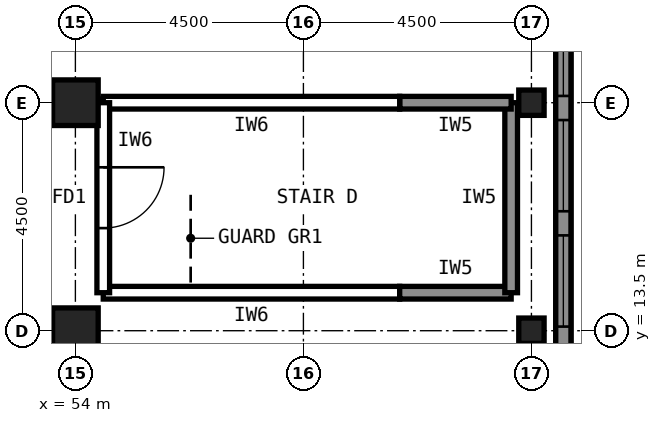
"""IFC4 building model, lengths in metres.
Left out: names, types, materials, properties, quantities, classifications, styles, units other than length and angle.
Written with IfcOpenShell. Run it as: python <this file> out.ifc"""

import sys

from ifc_helpers import new_model, si_unit, direction, frame, frame_2d, origin, origin_2d, place, context, subcontext, project, spatial, rectangle, hollow_rectangle, extrude, element, fill, save


model = new_model("IFC4")
c1 = context("Model", 3, precision=1e-05, world=origin(), true_north=direction((0.0, 1.0)))
c2 = subcontext(c1, "Body", "Model", "MODEL_VIEW")
j1 = project(units=[si_unit("LENGTHUNIT", "METRE"), si_unit("PLANEANGLEUNIT", "RADIAN")], contexts=[c1])
p1 = place(None, origin())
s1 = spatial("IfcSite", under=j1, at=p1, CompositionType="ELEMENT")
p2 = place(p1, origin())
s2 = spatial("IfcBuilding", under=s1, at=p2, CompositionType="ELEMENT")
p3 = place(p2, frame((0.0, 0.0, 18.0)))
s3 = spatial("IfcBuildingStorey", under=s2, at=p3, CompositionType="ELEMENT", Elevation=18.0)
for number, where, z_axis, x_axis in (
    (1, (54.0, 13.5, 0.0), (0.0, 0.0, 1.0), (1.0, 0.0, 0.0)),
    (2, (54.0, 18.0, 0.0), (0.0, 0.0, 1.0), (1.0, 0.0, 0.0)),
):
    element("IfcColumn", number, at=place(p3, frame(where, z_axis=z_axis, x_axis=x_axis)), inside=s3, PredefinedType="COLUMN", context=c2, shape_type="SweptSolid", body=[
        extrude(hollow_rectangle(XDim=0.9, YDim=0.9, WallThickness=0.063, at=origin_2d()), origin(), (0.0, 0.0, 1.0), 5.0),
    ])
for number, where, z_axis, x_axis in (
    (3, (63.0, 13.5, 0.0), (0.0, 0.0, 1.0), (1.0, 0.0, 0.0)),
    (4, (63.0, 18.0, 0.0), (0.0, 0.0, 1.0), (1.0, 0.0, 0.0)),
):
    element("IfcColumn", number, at=place(p3, frame(where, z_axis=z_axis, x_axis=x_axis)), inside=s3, PredefinedType="COLUMN", context=c2, shape_type="SweptSolid", body=[
        extrude(hollow_rectangle(XDim=0.5, YDim=0.5, WallThickness=0.022, at=origin_2d()), origin(), (0.0, 0.0, 1.0), 5.0),
    ])
p4 = place(p3, frame((63.63, 49.761, 0.0), z_axis=(0.0, 0.0, 1.0), x_axis=(0.0, -1.0, 0.0)))
e5 = element("IfcWall", 5, at=p4, inside=s3, PredefinedType="SOLIDWALL", context=c2, shape_type="SweptSolid", body=[
    extrude(rectangle(XDim=45.522, YDim=0.3, at=frame_2d((22.761, 0.0))), origin(), (0.0, 0.0, 1.0), 5.0),
])
p5 = place(p4, frame((2.514, 0.0, 1.1)))
e6 = element("IfcOpeningElement", 6, at=p5, cuts=e5, PredefinedType="OPENING", context=c2, shape_type="SweptSolid", body=[
    extrude(rectangle(XDim=1.8, YDim=1.2, at=frame_2d((0.9, 0.6))), frame((0.0, 0.16, 0.0), z_axis=(0.0, -1.0, 0.0), x_axis=(1.0, 0.0, 0.0)), (0.0, 0.0, 1.0), 0.32),
])
p6 = place(p4, frame((4.79, 0.0, 1.1)))
e7 = element("IfcOpeningElement", 7, at=p6, cuts=e5, PredefinedType="OPENING", context=c2, shape_type="SweptSolid", body=[
    extrude(rectangle(XDim=1.8, YDim=1.2, at=frame_2d((0.9, 0.6))), frame((0.0, 0.16, 0.0), z_axis=(0.0, -1.0, 0.0), x_axis=(1.0, 0.0, 0.0)), (0.0, 0.0, 1.0), 0.32),
])
p7 = place(p4, frame((7.066, 0.0, 1.1)))
e8 = element("IfcOpeningElement", 8, at=p7, cuts=e5, PredefinedType="OPENING", context=c2, shape_type="SweptSolid", body=[
    extrude(rectangle(XDim=1.8, YDim=1.2, at=frame_2d((0.9, 0.6))), frame((0.0, 0.16, 0.0), z_axis=(0.0, -1.0, 0.0), x_axis=(1.0, 0.0, 0.0)), (0.0, 0.0, 1.0), 0.32),
])
p8 = place(p4, frame((9.343, 0.0, 1.1)))
e9 = element("IfcOpeningElement", 9, at=p8, cuts=e5, PredefinedType="OPENING", context=c2, shape_type="SweptSolid", body=[
    extrude(rectangle(XDim=1.8, YDim=1.2, at=frame_2d((0.9, 0.6))), frame((0.0, 0.16, 0.0), z_axis=(0.0, -1.0, 0.0), x_axis=(1.0, 0.0, 0.0)), (0.0, 0.0, 1.0), 0.32),
])
p9 = place(p4, frame((11.619, 0.0, 1.1)))
e10 = element("IfcOpeningElement", 10, at=p9, cuts=e5, PredefinedType="OPENING", context=c2, shape_type="SweptSolid", body=[
    extrude(rectangle(XDim=1.8, YDim=1.2, at=frame_2d((0.9, 0.6))), frame((0.0, 0.16, 0.0), z_axis=(0.0, -1.0, 0.0), x_axis=(1.0, 0.0, 0.0)), (0.0, 0.0, 1.0), 0.32),
])
p10 = place(p4, frame((13.895, 0.0, 1.1)))
e11 = element("IfcOpeningElement", 11, at=p10, cuts=e5, PredefinedType="OPENING", context=c2, shape_type="SweptSolid", body=[
    extrude(rectangle(XDim=1.8, YDim=1.2, at=frame_2d((0.9, 0.6))), frame((0.0, 0.16, 0.0), z_axis=(0.0, -1.0, 0.0), x_axis=(1.0, 0.0, 0.0)), (0.0, 0.0, 1.0), 0.32),
])
p11 = place(p4, frame((16.171, 0.0, 1.1)))
e12 = element("IfcOpeningElement", 12, at=p11, cuts=e5, PredefinedType="OPENING", context=c2, shape_type="SweptSolid", body=[
    extrude(rectangle(XDim=1.8, YDim=1.2, at=frame_2d((0.9, 0.6))), frame((0.0, 0.16, 0.0), z_axis=(0.0, -1.0, 0.0), x_axis=(1.0, 0.0, 0.0)), (0.0, 0.0, 1.0), 0.32),
])
p12 = place(p4, frame((18.447, 0.0, 1.1)))
e13 = element("IfcOpeningElement", 13, at=p12, cuts=e5, PredefinedType="OPENING", context=c2, shape_type="SweptSolid", body=[
    extrude(rectangle(XDim=1.8, YDim=1.2, at=frame_2d((0.9, 0.6))), frame((0.0, 0.16, 0.0), z_axis=(0.0, -1.0, 0.0), x_axis=(1.0, 0.0, 0.0)), (0.0, 0.0, 1.0), 0.32),
])
p13 = place(p4, frame((20.723, 0.0, 1.1)))
e14 = element("IfcOpeningElement", 14, at=p13, cuts=e5, PredefinedType="OPENING", context=c2, shape_type="SweptSolid", body=[
    extrude(rectangle(XDim=1.8, YDim=1.2, at=frame_2d((0.9, 0.6))), frame((0.0, 0.16, 0.0), z_axis=(0.0, -1.0, 0.0), x_axis=(1.0, 0.0, 0.0)), (0.0, 0.0, 1.0), 0.32),
])
p14 = place(p4, frame((22.999, 0.0, 1.1)))
e15 = element("IfcOpeningElement", 15, at=p14, cuts=e5, PredefinedType="OPENING", context=c2, shape_type="SweptSolid", body=[
    extrude(rectangle(XDim=1.8, YDim=1.2, at=frame_2d((0.9, 0.6))), frame((0.0, 0.16, 0.0), z_axis=(0.0, -1.0, 0.0), x_axis=(1.0, 0.0, 0.0)), (0.0, 0.0, 1.0), 0.32),
])
p15 = place(p4, frame((25.275, 0.0, 1.1)))
e16 = element("IfcOpeningElement", 16, at=p15, cuts=e5, PredefinedType="OPENING", context=c2, shape_type="SweptSolid", body=[
    extrude(rectangle(XDim=1.8, YDim=1.2, at=frame_2d((0.9, 0.6))), frame((0.0, 0.16, 0.0), z_axis=(0.0, -1.0, 0.0), x_axis=(1.0, 0.0, 0.0)), (0.0, 0.0, 1.0), 0.32),
])
p16 = place(p4, frame((27.551, 0.0, 1.1)))
e17 = element("IfcOpeningElement", 17, at=p16, cuts=e5, PredefinedType="OPENING", context=c2, shape_type="SweptSolid", body=[
    extrude(rectangle(XDim=1.8, YDim=1.2, at=frame_2d((0.9, 0.6))), frame((0.0, 0.16, 0.0), z_axis=(0.0, -1.0, 0.0), x_axis=(1.0, 0.0, 0.0)), (0.0, 0.0, 1.0), 0.32),
])
p17 = place(p4, frame((29.827, 0.0, 1.1)))
e18 = element("IfcOpeningElement", 18, at=p17, cuts=e5, PredefinedType="OPENING", context=c2, shape_type="SweptSolid", body=[
    extrude(rectangle(XDim=1.8, YDim=1.2, at=frame_2d((0.9, 0.6))), frame((0.0, 0.16, 0.0), z_axis=(0.0, -1.0, 0.0), x_axis=(1.0, 0.0, 0.0)), (0.0, 0.0, 1.0), 0.32),
])
p18 = place(p4, frame((32.104, 0.0, 1.1)))
e19 = element("IfcOpeningElement", 19, at=p18, cuts=e5, PredefinedType="OPENING", context=c2, shape_type="SweptSolid", body=[
    extrude(rectangle(XDim=1.8, YDim=1.2, at=frame_2d((0.9, 0.6))), frame((0.0, 0.16, 0.0), z_axis=(0.0, -1.0, 0.0), x_axis=(1.0, 0.0, 0.0)), (0.0, 0.0, 1.0), 0.32),
])
p19 = place(p4, frame((34.38, 0.0, 1.1)))
e20 = element("IfcOpeningElement", 20, at=p19, cuts=e5, PredefinedType="OPENING", context=c2, shape_type="SweptSolid", body=[
    extrude(rectangle(XDim=1.8, YDim=1.2, at=frame_2d((0.9, 0.6))), frame((0.0, 0.16, 0.0), z_axis=(0.0, -1.0, 0.0), x_axis=(1.0, 0.0, 0.0)), (0.0, 0.0, 1.0), 0.32),
])
p20 = place(p4, frame((36.656, 0.0, 1.1)))
e21 = element("IfcOpeningElement", 21, at=p20, cuts=e5, PredefinedType="OPENING", context=c2, shape_type="SweptSolid", body=[
    extrude(rectangle(XDim=1.8, YDim=1.2, at=frame_2d((0.9, 0.6))), frame((0.0, 0.16, 0.0), z_axis=(0.0, -1.0, 0.0), x_axis=(1.0, 0.0, 0.0)), (0.0, 0.0, 1.0), 0.32),
])
p21 = place(p4, frame((38.932, 0.0, 1.1)))
e22 = element("IfcOpeningElement", 22, at=p21, cuts=e5, PredefinedType="OPENING", context=c2, shape_type="SweptSolid", body=[
    extrude(rectangle(XDim=1.8, YDim=1.2, at=frame_2d((0.9, 0.6))), frame((0.0, 0.16, 0.0), z_axis=(0.0, -1.0, 0.0), x_axis=(1.0, 0.0, 0.0)), (0.0, 0.0, 1.0), 0.32),
])
p22 = place(p4, frame((41.208, 0.0, 1.1)))
e23 = element("IfcOpeningElement", 23, at=p22, cuts=e5, PredefinedType="OPENING", context=c2, shape_type="SweptSolid", body=[
    extrude(rectangle(XDim=1.8, YDim=1.2, at=frame_2d((0.9, 0.6))), frame((0.0, 0.16, 0.0), z_axis=(0.0, -1.0, 0.0), x_axis=(1.0, 0.0, 0.0)), (0.0, 0.0, 1.0), 0.32),
])
p23 = place(p3, frame((43.5, 18.0, 0.0), z_axis=(0.0, 0.0, 1.0), x_axis=(1.0, 0.0, 0.0)))
e24 = element("IfcWall", 24, at=p23, inside=s3, PredefinedType="PARTITIONING", context=c2, shape_type="SweptSolid", body=[
    extrude(rectangle(XDim=11.0, YDim=0.15, at=frame_2d((5.5, 0.0))), origin(), (0.0, 0.0, 1.0), 3.682),
])
p24 = place(p3, frame((54.55, 14.25, 0.0), z_axis=(0.0, 0.0, 1.0), x_axis=(1.0, 0.0, 0.0)))
e25 = element("IfcWall", 25, at=p24, inside=s3, PredefinedType="PARTITIONING", context=c2, shape_type="SweptSolid", body=[
    extrude(rectangle(XDim=5.85, YDim=0.25, at=frame_2d((2.925, 0.0))), origin(), (0.0, 0.0, 1.0), 4.8),
])
p25 = place(p3, frame((60.4, 14.25, 0.0), z_axis=(0.0, 0.0, 1.0), x_axis=(1.0, 0.0, 0.0)))
e26 = element("IfcWall", 26, at=p25, inside=s3, PredefinedType="SOLIDWALL", context=c2, shape_type="SweptSolid", body=[
    extrude(rectangle(XDim=2.2, YDim=0.25, at=frame_2d((1.1, 0.0))), origin(), (0.0, 0.0, 1.0), 4.8),
])
p26 = place(p3, frame((62.6, 14.25, 0.0), z_axis=(0.0, 0.0, 1.0), x_axis=(0.0, 1.0, 0.0)))
e27 = element("IfcWall", 27, at=p26, inside=s3, PredefinedType="SOLIDWALL", context=c2, shape_type="SweptSolid", body=[
    extrude(rectangle(XDim=3.75, YDim=0.25, at=frame_2d((1.875, 0.0))), origin(), (0.0, 0.0, 1.0), 4.8),
])
p27 = place(p3, frame((62.6, 18.0, 0.0), z_axis=(0.0, 0.0, 1.0), x_axis=(-1.0, 0.0, 0.0)))
e28 = element("IfcWall", 28, at=p27, inside=s3, PredefinedType="SOLIDWALL", context=c2, shape_type="SweptSolid", body=[
    extrude(rectangle(XDim=2.2, YDim=0.25, at=frame_2d((1.1, 0.0))), origin(), (0.0, 0.0, 1.0), 4.189),
])
p28 = place(p3, frame((60.4, 18.0, 0.0), z_axis=(0.0, 0.0, 1.0), x_axis=(-1.0, 0.0, 0.0)))
e29 = element("IfcWall", 29, at=p28, inside=s3, PredefinedType="PARTITIONING", context=c2, shape_type="SweptSolid", body=[
    extrude(rectangle(XDim=5.85, YDim=0.25, at=frame_2d((2.925, 0.0))), origin(), (0.0, 0.0, 1.0), 4.189),
])
p29 = place(p3, frame((54.55, 18.0, 0.0), z_axis=(0.0, 0.0, 1.0), x_axis=(0.0, -1.0, 0.0)))
e30 = element("IfcWall", 30, at=p29, inside=s3, PredefinedType="PARTITIONING", context=c2, shape_type="SweptSolid", body=[
    extrude(rectangle(XDim=3.75, YDim=0.25, at=frame_2d((1.875, 0.0))), origin(), (0.0, 0.0, 1.0), 4.8),
])
p30 = place(p29, frame((1.275, 0.0, 0.0)))
e31 = element("IfcOpeningElement", 31, at=p30, cuts=e30, PredefinedType="OPENING", context=c2, shape_type="SweptSolid", body=[
    extrude(rectangle(XDim=1.2, YDim=2.1, at=frame_2d((0.6, 1.05))), frame((0.0, 0.135, 0.0), z_axis=(0.0, -1.0, 0.0), x_axis=(1.0, 0.0, 0.0)), (0.0, 0.0, 1.0), 0.27),
])
p31 = place(p3, frame((63.63, 49.761, 5.0), z_axis=(0.0, 0.0, 1.0), x_axis=(0.0, -1.0, 0.0)))
e32 = element("IfcWall", 32, at=p31, inside=s3, PredefinedType="PARAPET", context=c2, shape_type="SweptSolid", body=[
    extrude(rectangle(XDim=45.522, YDim=0.3, at=frame_2d((22.761, 0.0))), origin(), (0.0, 0.0, 1.0), 1.1),
])
p32 = place(p17, origin())
e33 = element("IfcWindow", 33, at=p32, inside=s3, PartitioningType="SINGLE_PANEL", PredefinedType="WINDOW", context=c2, shape_type="SweptSolid", body=[
    extrude(rectangle(XDim=1.8, YDim=1.2, at=frame_2d((0.9, 0.6))), frame((0.0, 0.03, 0.0), z_axis=(0.0, -1.0, 0.0), x_axis=(1.0, 0.0, 0.0)), (0.0, 0.0, 1.0), 0.06),
])
fill(e18, e33)
p33 = place(p18, origin())
e34 = element("IfcWindow", 34, at=p33, inside=s3, PartitioningType="SINGLE_PANEL", PredefinedType="WINDOW", context=c2, shape_type="SweptSolid", body=[
    extrude(rectangle(XDim=1.8, YDim=1.2, at=frame_2d((0.9, 0.6))), frame((0.0, 0.03, 0.0), z_axis=(0.0, -1.0, 0.0), x_axis=(1.0, 0.0, 0.0)), (0.0, 0.0, 1.0), 0.06),
])
fill(e19, e34)
p34 = place(p19, origin())
e35 = element("IfcWindow", 35, at=p34, inside=s3, PartitioningType="SINGLE_PANEL", PredefinedType="WINDOW", context=c2, shape_type="SweptSolid", body=[
    extrude(rectangle(XDim=1.8, YDim=1.2, at=frame_2d((0.9, 0.6))), frame((0.0, 0.03, 0.0), z_axis=(0.0, -1.0, 0.0), x_axis=(1.0, 0.0, 0.0)), (0.0, 0.0, 1.0), 0.06),
])
fill(e20, e35)
p35 = place(p30, origin())
e36 = element("IfcDoor", 36, at=p35, inside=s3, OperationType="SINGLE_SWING_LEFT", PredefinedType="DOOR", context=c2, shape_type="SweptSolid", body=[
    extrude(rectangle(XDim=1.2, YDim=2.1, at=frame_2d((0.6, 1.05))), frame((0.0, 0.025, 0.0), z_axis=(0.0, -1.0, 0.0), x_axis=(1.0, 0.0, 0.0)), (0.0, 0.0, 1.0), 0.05),
])
fill(e31, e36)
save(model, sys.argv[1])
